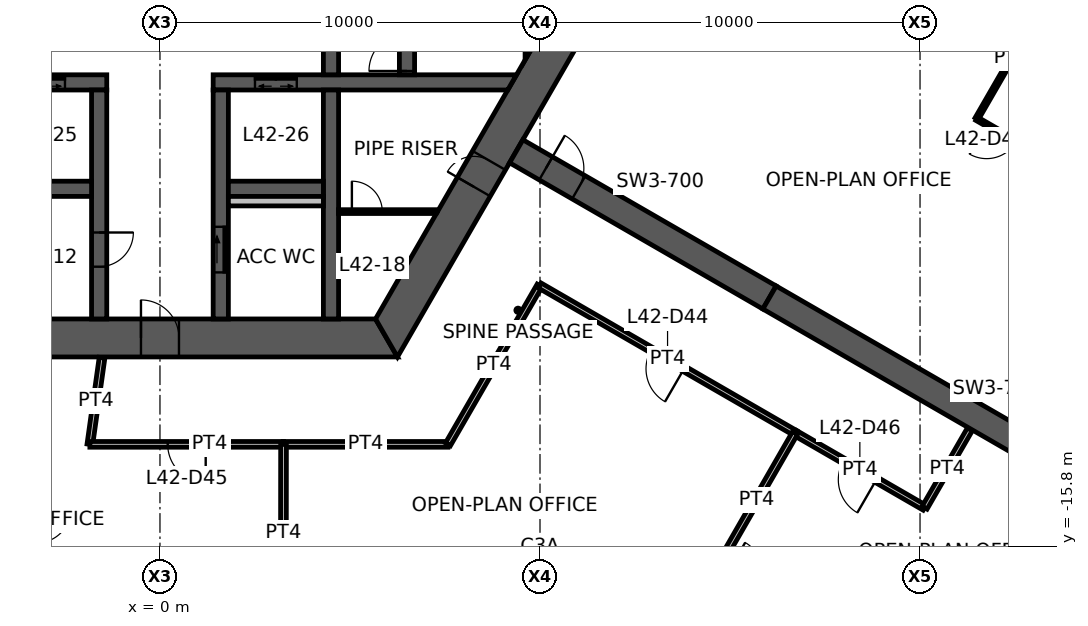
"""IFC4 building model, lengths in metres.
Left out: names, types, materials, properties, quantities, classifications, styles, units other than length and angle.
Written with IfcOpenShell. Run it as: python <this file> out.ifc"""

import sys

from ifc_helpers import new_model, si_unit, direction, frame, frame_2d, origin, place, context, subcontext, project, spatial, polyline, rectangle, outline, extrude, element, fill, save


model = new_model("IFC4")
c1 = context("Model", 3, precision=1e-05, world=origin(), true_north=direction((0.0, 1.0)))
c2 = subcontext(c1, "Body", "Model", "MODEL_VIEW")
j1 = project(units=[si_unit("LENGTHUNIT", "METRE"), si_unit("PLANEANGLEUNIT", "RADIAN")], contexts=[c1])
p1 = place(None, origin())
s1 = spatial("IfcSite", under=j1, at=p1, CompositionType="ELEMENT")
p2 = place(p1, origin())
s2 = spatial("IfcBuilding", under=s1, at=p2, CompositionType="ELEMENT")
p3 = place(p2, frame((0.0, 0.0, 168.2)))
s3 = spatial("IfcBuildingStorey", under=s2, at=p3, CompositionType="ELEMENT", Elevation=168.2)
p4 = place(p3, frame((-5.961, -10.325, 0.0), z_axis=(0.0, 0.0, 1.0), x_axis=(1.0, 0.0, 0.0)))
e1 = element("IfcWall", 1, at=p4, inside=s3, PredefinedType="SHEAR", context=c2, shape_type="SweptSolid", body=[
    extrude(outline(polyline([(-0.289, -0.5), (5.461, -0.5), (6.461, -0.5), (12.211, -0.5), (11.634, 0.5), (6.461, 0.5), (5.461, 0.5), (0.289, 0.5), (-0.289, -0.5)])), origin(), (0.0, 0.0, 1.0), 3.9),
])
p5 = place(p4, frame((5.461, 0.0, 0.0)))
e2 = element("IfcOpeningElement", 2, at=p5, cuts=e1, PredefinedType="OPENING", context=c2, shape_type="SweptSolid", body=[
    extrude(rectangle(XDim=1.0, YDim=2.1, at=frame_2d((0.5, 1.05))), frame((0.0, 0.51, 0.0), z_axis=(0.0, -1.0, 0.0), x_axis=(1.0, 0.0, 0.0)), (0.0, 0.0, 1.0), 1.02),
])
p6 = place(p3, frame((5.961, -10.325, 0.0), z_axis=(0.0, 0.0, 1.0), x_axis=(0.500004296715, 0.866022923061, 0.0)))
e3 = element("IfcWall", 3, at=p6, inside=s3, PredefinedType="SHEAR", context=c2, shape_type="SweptSolid", body=[
    extrude(outline(polyline([(-0.289, -0.5), (4.594, -0.5), (5.394, -0.5), (12.211, -0.5), (11.634, 0.5), (5.394, 0.5), (4.594, 0.5), (0.289, 0.5), (-0.289, -0.5)])), origin(), (0.0, 0.0, 1.0), 3.9),
])
p7 = place(p6, frame((4.594, 0.0, 0.0)))
e4 = element("IfcOpeningElement", 4, at=p7, cuts=e3, PredefinedType="OPENING", context=c2, shape_type="SweptSolid", body=[
    extrude(rectangle(XDim=0.8, YDim=2.1, at=frame_2d((0.4, 1.05))), frame((0.0, 0.51, 0.0), z_axis=(0.0, -1.0, 0.0), x_axis=(1.0, 0.0, 0.0)), (0.0, 0.0, 1.0), 1.02),
])
p8 = place(p3, frame((9.375, -5.413, 0.0), z_axis=(0.0, 0.0, 1.0), x_axis=(0.866032377459, -0.499987921047, 0.0)))
e5 = element("IfcWall", 5, at=p8, inside=s3, PredefinedType="SHEAR", context=c2, shape_type="SweptSolid", body=[
    extrude(rectangle(XDim=7.696, YDim=0.7, at=frame_2d((3.848, 0.0))), origin(), (0.0, 0.0, 1.0), 3.9),
])
p9 = place(p8, frame((0.9, 0.0, 0.0)))
e6 = element("IfcOpeningElement", 6, at=p9, cuts=e5, PredefinedType="OPENING", context=c2, shape_type="SweptSolid", body=[
    extrude(rectangle(XDim=1.0, YDim=2.1, at=frame_2d((0.5, 1.05))), frame((0.0, 0.36, 0.0), z_axis=(0.0, -1.0, 0.0), x_axis=(1.0, 0.0, 0.0)), (0.0, 0.0, 1.0), 0.72),
])
p10 = place(p3, frame((16.039, -9.26, 0.0), z_axis=(0.0, 0.0, 1.0), x_axis=(0.866024837091, -0.50000098154, 0.0)))
e7 = element("IfcWall", 7, at=p10, inside=s3, PredefinedType="SHEAR", context=c2, shape_type="SweptSolid", body=[
    extrude(rectangle(XDim=13.0, YDim=0.7, at=frame_2d((6.5, 0.0))), origin(), (0.0, 0.0, 1.0), 3.9),
])
p11 = place(p3, frame((-9.266, -3.6, 0.0), z_axis=(0.0, 0.0, 1.0), x_axis=(1.0, 0.0, 0.0)))
e8 = element("IfcWall", 8, at=p11, inside=s3, PredefinedType="SHEAR", context=c2, shape_type="SweptSolid", body=[
    extrude(outline(polyline([(0.115, -0.2), (3.116, -0.2), (4.417, -0.2), (5.667, -0.2), (6.767, -0.2), (7.866, -0.2), (7.866, 0.2), (6.767, 0.2), (5.667, 0.2), (4.417, 0.2), (3.116, 0.2), (-0.115, 0.2), (0.115, -0.2)])), origin(), (0.0, 0.0, 1.0), 3.9),
])
p12 = place(p11, frame((5.667, 0.0, 0.0)))
e9 = element("IfcOpeningElement", 9, at=p12, cuts=e8, PredefinedType="OPENING", context=c2, shape_type="SweptSolid", body=[
    extrude(rectangle(XDim=1.1, YDim=2.1, at=frame_2d((0.55, 1.05))), frame((0.0, 0.21, 0.0), z_axis=(0.0, -1.0, 0.0), x_axis=(1.0, 0.0, 0.0)), (0.0, 0.0, 1.0), 0.42),
])
p13 = place(p11, frame((3.116, 0.0, 0.0)))
e10 = element("IfcOpeningElement", 10, at=p13, cuts=e8, PredefinedType="OPENING", context=c2, shape_type="SweptSolid", body=[
    extrude(rectangle(XDim=1.3, YDim=2.1, at=frame_2d((0.65, 1.05))), frame((0.0, 0.21, 0.0), z_axis=(0.0, -1.0, 0.0), x_axis=(1.0, 0.0, 0.0)), (0.0, 0.0, 1.0), 0.42),
])
p14 = place(p3, frame((1.4, -3.6, 0.0), z_axis=(0.0, 0.0, 1.0), x_axis=(1.0, 0.0, 0.0)))
e11 = element("IfcWall", 11, at=p14, inside=s3, PredefinedType="SHEAR", context=c2, shape_type="SweptSolid", body=[
    extrude(outline(polyline([(0.0, -0.2), (1.1, -0.2), (2.2, -0.2), (7.751, -0.2), (7.982, 0.2), (2.2, 0.2), (1.1, 0.2), (0.0, 0.2), (0.0, -0.2)])), origin(), (0.0, 0.0, 1.0), 3.9),
])
p15 = place(p14, frame((1.1, 0.0, 0.0)))
e12 = element("IfcOpeningElement", 12, at=p15, cuts=e11, PredefinedType="OPENING", context=c2, shape_type="SweptSolid", body=[
    extrude(rectangle(XDim=1.1, YDim=2.1, at=frame_2d((0.55, 1.05))), frame((0.0, 0.21, 0.0), z_axis=(0.0, -1.0, 0.0), x_axis=(1.0, 0.0, 0.0)), (0.0, 0.0, 1.0), 0.42),
])
p16 = place(p3, frame((-1.6, -3.8, 0.0), z_axis=(0.0, 0.0, 1.0), x_axis=(0.0, -1.0, 0.0)))
e13 = element("IfcWall", 13, at=p16, inside=s3, PredefinedType="SHEAR", context=c2, shape_type="SweptSolid", body=[
    extrude(rectangle(XDim=6.025, YDim=0.4, at=frame_2d((3.012, 0.0))), origin(), (0.0, 0.0, 1.0), 3.9),
])
p17 = place(p16, frame((3.75, 0.0, 0.0)))
e14 = element("IfcOpeningElement", 14, at=p17, cuts=e13, PredefinedType="OPENING", context=c2, shape_type="SweptSolid", body=[
    extrude(rectangle(XDim=0.9, YDim=2.1, at=frame_2d((0.45, 1.05))), frame((0.0, 0.21, 0.0), z_axis=(0.0, -1.0, 0.0), x_axis=(1.0, 0.0, 0.0)), (0.0, 0.0, 1.0), 0.42),
])
p18 = place(p3, frame((1.6, -3.8, 0.0), z_axis=(0.0, 0.0, 1.0), x_axis=(0.0, -1.0, 0.0)))
e15 = element("IfcWall", 15, at=p18, inside=s3, PredefinedType="SHEAR", context=c2, shape_type="SweptSolid", body=[
    extrude(rectangle(XDim=6.025, YDim=0.4, at=frame_2d((3.012, 0.0))), origin(), (0.0, 0.0, 1.0), 3.9),
])
p19 = place(p18, frame((3.6, 0.0, 0.0)))
e16 = element("IfcOpeningElement", 16, at=p19, cuts=e15, PredefinedType="OPENING", context=c2, shape_type="SweptSolid", body=[
    extrude(rectangle(XDim=1.2, YDim=2.1, at=frame_2d((0.6, 1.05))), frame((0.0, 0.21, 0.0), z_axis=(0.0, -1.0, 0.0), x_axis=(1.0, 0.0, 0.0)), (0.0, 0.0, 1.0), 0.42),
])
p20 = place(p3, frame((4.5, -3.4, 0.0), z_axis=(0.0, 0.0, 1.0), x_axis=(0.0, 1.0, 0.0)))
e17 = element("IfcWall", 17, at=p20, inside=s3, PredefinedType="SHEAR", context=c2, shape_type="SweptSolid", body=[
    extrude(rectangle(XDim=6.8, YDim=0.4, at=frame_2d((3.4, 0.0))), origin(), (0.0, 0.0, 1.0), 3.9),
])
p21 = place(p20, frame((2.9, 0.0, 0.0)))
e18 = element("IfcOpeningElement", 18, at=p21, cuts=e17, PredefinedType="OPENING", context=c2, shape_type="SweptSolid", body=[
    extrude(rectangle(XDim=1.0, YDim=2.1, at=frame_2d((0.5, 1.05))), frame((0.0, 0.21, 0.0), z_axis=(0.0, -1.0, 0.0), x_axis=(1.0, 0.0, 0.0)), (0.0, 0.0, 1.0), 0.42),
])
p22 = place(p3, frame((6.5, -3.4, 0.0), z_axis=(0.0, 0.0, 1.0), x_axis=(0.0, 1.0, 0.0)))
e19 = element("IfcWall", 19, at=p22, inside=s3, PredefinedType="SHEAR", context=c2, shape_type="SweptSolid", body=[
    extrude(rectangle(XDim=6.8, YDim=0.4, at=frame_2d((3.4, 0.0))), origin(), (0.0, 0.0, 1.0), 3.9),
])
p23 = place(p22, frame((0.1, 0.0, 0.0)))
e20 = element("IfcOpeningElement", 20, at=p23, cuts=e19, PredefinedType="OPENING", context=c2, shape_type="SweptSolid", body=[
    extrude(rectangle(XDim=1.0, YDim=2.1, at=frame_2d((0.5, 1.05))), frame((0.0, 0.21, 0.0), z_axis=(0.0, -1.0, 0.0), x_axis=(1.0, 0.0, 0.0)), (0.0, 0.0, 1.0), 0.42),
])
p24 = place(p3, frame((4.5, -3.8, 0.0), z_axis=(0.0, 0.0, 1.0), x_axis=(0.0, -1.0, 0.0)))
e21 = element("IfcWall", 21, at=p24, inside=s3, PredefinedType="SHEAR", context=c2, shape_type="SweptSolid", body=[
    extrude(rectangle(XDim=6.025, YDim=0.4, at=frame_2d((3.012, 0.0))), origin(), (0.0, 0.0, 1.0), 3.9),
])
for number, where, z_axis, x_axis in (
    (22, (-4.3, -6.4, 0.0), (0.0, 0.0, 1.0), (1.0, 0.0, 0.0)),
    (23, (1.8, -6.4, 0.0), (0.0, 0.0, 1.0), (1.0, 0.0, 0.0)),
):
    element("IfcWall", number, at=place(p3, frame(where, z_axis=z_axis, x_axis=x_axis)), inside=s3, PredefinedType="SHEAR", context=c2, shape_type="SweptSolid", body=[
        extrude(rectangle(XDim=2.5, YDim=0.4, at=frame_2d((1.25, 0.0))), origin(), (0.0, 0.0, 1.0), 3.9),
    ])
p25 = place(p3, frame((9.808, -2.662, 0.0), z_axis=(0.0, 0.0, 1.0), x_axis=(0.0, 1.0, 0.0)))
e24 = element("IfcWall", 24, at=p25, inside=s3, PredefinedType="SHEAR", context=c2, shape_type="SweptSolid", body=[
    extrude(outline(polyline([(0.346, -0.2), (4.978, -0.2), (5.671, 0.2), (-0.346, 0.2), (0.346, -0.2)])), origin(), (0.0, 0.0, 1.0), 3.9),
])
p26 = place(p3, frame((1.8, -6.725, 0.0), z_axis=(0.0, 0.0, 1.0), x_axis=(1.0, 0.0, 0.0)))
e25 = element("IfcWall", 25, at=p26, inside=s3, PredefinedType="PLUMBINGWALL", context=c2, shape_type="SweptSolid", body=[
    extrude(rectangle(XDim=2.5, YDim=0.25, at=frame_2d((1.25, 0.0))), origin(), (0.0, 0.0, 1.0), 3.9),
])
p27 = place(p3, frame((4.7, -7.0, 0.0), z_axis=(0.0, 0.0, 1.0), x_axis=(1.0, 0.0, 0.0)))
e26 = element("IfcWall", 26, at=p27, inside=s3, PredefinedType="PARTITIONING", context=c2, shape_type="SweptSolid", body=[
    extrude(outline(polyline([(0.0, -0.05), (0.35, -0.05), (1.15, -0.05), (2.575, -0.05), (2.604, 0.0), (2.609, 0.05), (1.15, 0.05), (0.35, 0.05), (0.0, 0.05), (0.0, -0.05)])), origin(), (0.0, 0.0, 1.0), 2.95),
])
p28 = place(p27, frame((0.35, 0.0, 0.0)))
e27 = element("IfcOpeningElement", 27, at=p28, cuts=e26, PredefinedType="OPENING", context=c2, shape_type="SweptSolid", body=[
    extrude(rectangle(XDim=0.8, YDim=2.1, at=frame_2d((0.4, 1.05))), frame((0.0, 0.06, 0.0), z_axis=(0.0, -1.0, 0.0), x_axis=(1.0, 0.0, 0.0)), (0.0, 0.0, 1.0), 0.12),
])
p29 = place(p3, frame((21.492, -4.557, 0.0), z_axis=(0.0, 0.0, 1.0), x_axis=(0.500013413428, 0.866017659399, 0.0)))
e28 = element("IfcWall", 28, at=p29, inside=s3, PredefinedType="PARTITIONING", context=c2, shape_type="SweptSolid", body=[
    extrude(rectangle(XDim=3.68, YDim=0.1, at=frame_2d((1.84, 0.0))), origin(), (0.0, 0.0, 1.0), 2.95),
])
p30 = place(p3, frame((27.227, -7.863, 0.0), z_axis=(0.0, 0.0, 1.0), x_axis=(-0.866343956507, 0.499447844147, 0.0)))
e29 = element("IfcWall", 29, at=p30, inside=s3, PredefinedType="PARTITIONING", context=c2, shape_type="SweptSolid", body=[
    extrude(rectangle(XDim=6.62, YDim=0.1, at=frame_2d((3.31, 0.0))), origin(), (0.0, 0.0, 1.0), 2.95),
])
p31 = place(p30, frame((5.42, 0.0, 0.0)))
e30 = element("IfcOpeningElement", 30, at=p31, cuts=e29, PredefinedType="OPENING", context=c2, shape_type="SweptSolid", body=[
    extrude(rectangle(XDim=0.9, YDim=2.1, at=frame_2d((0.45, 1.05))), frame((0.0, 0.06, 0.0), z_axis=(0.0, -1.0, 0.0), x_axis=(1.0, 0.0, 0.0)), (0.0, 0.0, 1.0), 0.12),
])
p32 = place(p3, frame((7.578, -13.125, 0.0), z_axis=(0.0, 0.0, 1.0), x_axis=(-1.0, 0.0, 0.0)))
e31 = element("IfcWall", 31, at=p32, inside=s3, PredefinedType="PARTITIONING", context=c2, shape_type="SweptSolid", body=[
    extrude(rectangle(XDim=4.336, YDim=0.15, at=frame_2d((2.168, 0.0))), origin(), (0.0, 0.0, 1.0), 2.95),
])
p33 = place(p3, frame((9.992, -8.944, 0.0), z_axis=(0.0, 0.0, 1.0), x_axis=(-0.500033248206, -0.866006207073, 0.0)))
e32 = element("IfcWall", 32, at=p33, inside=s3, PredefinedType="PARTITIONING", context=c2, shape_type="SweptSolid", body=[
    extrude(rectangle(XDim=4.828, YDim=0.15, at=frame_2d((2.414, 0.0))), origin(), (0.0, 0.0, 1.0), 2.95),
])
p34 = place(p3, frame((16.721, -12.83, 0.0), z_axis=(0.0, 0.0, 1.0), x_axis=(-0.866020780657, 0.500008007406, 0.0)))
e33 = element("IfcWall", 33, at=p34, inside=s3, PredefinedType="PARTITIONING", context=c2, shape_type="SweptSolid", body=[
    extrude(rectangle(XDim=7.771, YDim=0.15, at=frame_2d((3.885, 0.0))), origin(), (0.0, 0.0, 1.0), 2.95),
])
p35 = place(p34, frame((3.385, 0.0, 0.0)))
e34 = element("IfcOpeningElement", 34, at=p35, cuts=e33, PredefinedType="OPENING", context=c2, shape_type="SweptSolid", body=[
    extrude(rectangle(XDim=1.0, YDim=2.1, at=frame_2d((0.5, 1.05))), frame((0.0, 0.085, 0.0), z_axis=(0.0, -1.0, 0.0), x_axis=(1.0, 0.0, 0.0)), (0.0, 0.0, 1.0), 0.17),
])
p36 = place(p3, frame((-1.844, -13.125, 0.0), z_axis=(0.0, 0.0, 1.0), x_axis=(0.139119980631, 0.990275532864, 0.0)))
e35 = element("IfcWall", 35, at=p36, inside=s3, PredefinedType="PARTITIONING", context=c2, shape_type="SweptSolid", body=[
    extrude(rectangle(XDim=2.302, YDim=0.15, at=frame_2d((1.151, 0.0))), origin(), (0.0, 0.0, 1.0), 2.95),
])
p37 = place(p3, frame((3.251, -13.125, 0.0), z_axis=(0.0, 0.0, 1.0), x_axis=(-1.0, 0.0, 0.0)))
e36 = element("IfcWall", 36, at=p37, inside=s3, PredefinedType="PARTITIONING", context=c2, shape_type="SweptSolid", body=[
    extrude(rectangle(XDim=5.096, YDim=0.15, at=frame_2d((2.548, 0.0))), origin(), (0.0, 0.0, 1.0), 2.95),
])
p38 = place(p37, frame((2.048, 0.0, 0.0)))
e37 = element("IfcOpeningElement", 37, at=p38, cuts=e36, PredefinedType="OPENING", context=c2, shape_type="SweptSolid", body=[
    extrude(rectangle(XDim=1.0, YDim=2.1, at=frame_2d((0.5, 1.05))), frame((0.0, 0.085, 0.0), z_axis=(0.0, -1.0, 0.0), x_axis=(1.0, 0.0, 0.0)), (0.0, 0.0, 1.0), 0.17),
])
p39 = place(p3, frame((20.12, -14.792, 0.0), z_axis=(0.0, 0.0, 1.0), x_axis=(-0.866038848349, 0.499976712608, 0.0)))
e38 = element("IfcWall", 38, at=p39, inside=s3, PredefinedType="PARTITIONING", context=c2, shape_type="SweptSolid", body=[
    extrude(rectangle(XDim=3.934, YDim=0.15, at=frame_2d((1.967, 0.0))), origin(), (0.0, 0.0, 1.0), 2.95),
])
p40 = place(p39, frame((1.467, 0.0, 0.0)))
e39 = element("IfcOpeningElement", 39, at=p40, cuts=e38, PredefinedType="OPENING", context=c2, shape_type="SweptSolid", body=[
    extrude(rectangle(XDim=1.0, YDim=2.1, at=frame_2d((0.5, 1.05))), frame((0.0, 0.085, 0.0), z_axis=(0.0, -1.0, 0.0), x_axis=(1.0, 0.0, 0.0)), (0.0, 0.0, 1.0), 0.17),
])
p41 = place(p3, frame((21.31, -12.731, 0.0), z_axis=(0.0, 0.0, 1.0), x_axis=(-0.500077627542, -0.865980580863, 0.0)))
e40 = element("IfcWall", 40, at=p41, inside=s3, PredefinedType="PARTITIONING", context=c2, shape_type="SweptSolid", body=[
    extrude(rectangle(XDim=2.38, YDim=0.15, at=frame_2d((1.19, 0.0))), origin(), (0.0, 0.0, 1.0), 2.95),
])
p42 = place(p3, frame((3.246, -17.801, 0.0), z_axis=(0.0, 0.0, 1.0), x_axis=(0.001096662352, 0.999999398666, 0.0)))
e41 = element("IfcWall", 41, at=p42, inside=s3, PredefinedType="PARTITIONING", context=c2, shape_type="SweptSolid", body=[
    extrude(rectangle(XDim=4.675, YDim=0.15, at=frame_2d((2.337, 0.0))), origin(), (0.0, 0.0, 1.0), 2.95),
])
p43 = place(p3, frame((16.713, -12.825, 0.0), z_axis=(0.0, 0.0, 1.0), x_axis=(-0.498976779382, -0.866615355067, 0.0)))
e42 = element("IfcWall", 42, at=p43, inside=s3, PredefinedType="PARTITIONING", context=c2, shape_type="SweptSolid", body=[
    extrude(rectangle(XDim=4.054, YDim=0.15, at=frame_2d((2.027, 0.0))), origin(), (0.0, 0.0, 1.0), 2.95),
])
p44 = place(p5, origin())
e43 = element("IfcDoor", 43, at=p44, inside=s3, OperationType="SINGLE_SWING_LEFT", PredefinedType="DOOR", context=c2, shape_type="SweptSolid", body=[
    extrude(rectangle(XDim=1.0, YDim=2.1, at=frame_2d((0.5, 1.05))), frame((0.0, 0.025, 0.0), z_axis=(0.0, -1.0, 0.0), x_axis=(1.0, 0.0, 0.0)), (0.0, 0.0, 1.0), 0.05),
])
fill(e2, e43)
p45 = place(p7, origin())
e44 = element("IfcDoor", 44, at=p45, inside=s3, OperationType="SINGLE_SWING_LEFT", PredefinedType="DOOR", context=c2, shape_type="SweptSolid", body=[
    extrude(rectangle(XDim=0.8, YDim=2.1, at=frame_2d((0.4, 1.05))), frame((0.0, 0.025, 0.0), z_axis=(0.0, -1.0, 0.0), x_axis=(1.0, 0.0, 0.0)), (0.0, 0.0, 1.0), 0.05),
])
fill(e4, e44)
p46 = place(p23, origin())
e45 = element("IfcDoor", 45, at=p46, inside=s3, OperationType="SINGLE_SWING_LEFT", PredefinedType="DOOR", context=c2, shape_type="SweptSolid", body=[
    extrude(rectangle(XDim=1.0, YDim=2.1, at=frame_2d((0.5, 1.05))), frame((0.0, 0.025, 0.0), z_axis=(0.0, -1.0, 0.0), x_axis=(1.0, 0.0, 0.0)), (0.0, 0.0, 1.0), 0.05),
])
fill(e20, e45)
p47 = place(p19, origin())
e46 = element("IfcDoor", 46, at=p47, inside=s3, OperationType="SLIDING_TO_LEFT", PredefinedType="DOOR", context=c2, shape_type="SweptSolid", body=[
    extrude(rectangle(XDim=1.2, YDim=2.1, at=frame_2d((0.6, 1.05))), frame((0.0, 0.025, 0.0), z_axis=(0.0, -1.0, 0.0), x_axis=(1.0, 0.0, 0.0)), (0.0, 0.0, 1.0), 0.05),
])
fill(e16, e46)
p48 = place(p17, origin())
e47 = element("IfcDoor", 47, at=p48, inside=s3, OperationType="SINGLE_SWING_LEFT", PredefinedType="DOOR", context=c2, shape_type="SweptSolid", body=[
    extrude(rectangle(XDim=0.9, YDim=2.1, at=frame_2d((0.45, 1.05))), frame((0.0, 0.025, 0.0), z_axis=(0.0, -1.0, 0.0), x_axis=(1.0, 0.0, 0.0)), (0.0, 0.0, 1.0), 0.05),
])
fill(e14, e47)
p49 = place(p9, origin())
e48 = element("IfcDoor", 48, at=p49, inside=s3, OperationType="SINGLE_SWING_LEFT", PredefinedType="DOOR", context=c2, shape_type="SweptSolid", body=[
    extrude(rectangle(XDim=1.0, YDim=2.1, at=frame_2d((0.5, 1.05))), frame((0.0, 0.025, 0.0), z_axis=(0.0, -1.0, 0.0), x_axis=(1.0, 0.0, 0.0)), (0.0, 0.0, 1.0), 0.05),
])
fill(e6, e48)
p50 = place(p28, origin())
e49 = element("IfcDoor", 49, at=p50, inside=s3, OperationType="SINGLE_SWING_LEFT", PredefinedType="DOOR", context=c2, shape_type="SweptSolid", body=[
    extrude(rectangle(XDim=0.8, YDim=2.1, at=frame_2d((0.4, 1.05))), frame((0.0, 0.025, 0.0), z_axis=(0.0, -1.0, 0.0), x_axis=(1.0, 0.0, 0.0)), (0.0, 0.0, 1.0), 0.05),
])
fill(e27, e49)
p51 = place(p31, origin())
e50 = element("IfcDoor", 50, at=p51, inside=s3, OperationType="SINGLE_SWING_RIGHT", PredefinedType="DOOR", context=c2, shape_type="SweptSolid", body=[
    extrude(rectangle(XDim=0.9, YDim=2.1, at=frame_2d((0.45, 1.05))), frame((0.0, 0.025, 0.0), z_axis=(0.0, -1.0, 0.0), x_axis=(1.0, 0.0, 0.0)), (0.0, 0.0, 1.0), 0.05),
])
fill(e30, e50)
p52 = place(p35, origin())
e51 = element("IfcDoor", 51, at=p52, inside=s3, OperationType="SINGLE_SWING_LEFT", PredefinedType="DOOR", context=c2, shape_type="SweptSolid", body=[
    extrude(rectangle(XDim=1.0, YDim=2.1, at=frame_2d((0.5, 1.05))), frame((0.0, 0.025, 0.0), z_axis=(0.0, -1.0, 0.0), x_axis=(1.0, 0.0, 0.0)), (0.0, 0.0, 1.0), 0.05),
])
fill(e34, e51)
p53 = place(p38, origin())
e52 = element("IfcDoor", 52, at=p53, inside=s3, OperationType="SINGLE_SWING_LEFT", PredefinedType="DOOR", context=c2, shape_type="SweptSolid", body=[
    extrude(rectangle(XDim=1.0, YDim=2.1, at=frame_2d((0.5, 1.05))), frame((0.0, 0.025, 0.0), z_axis=(0.0, -1.0, 0.0), x_axis=(1.0, 0.0, 0.0)), (0.0, 0.0, 1.0), 0.05),
])
fill(e37, e52)
p54 = place(p40, origin())
e53 = element("IfcDoor", 53, at=p54, inside=s3, OperationType="SINGLE_SWING_LEFT", PredefinedType="DOOR", context=c2, shape_type="SweptSolid", body=[
    extrude(rectangle(XDim=1.0, YDim=2.1, at=frame_2d((0.5, 1.05))), frame((0.0, 0.025, 0.0), z_axis=(0.0, -1.0, 0.0), x_axis=(1.0, 0.0, 0.0)), (0.0, 0.0, 1.0), 0.05),
])
fill(e39, e53)
p55 = place(p15, origin())
e54 = element("IfcDoor", 54, at=p55, inside=s3, OperationType="DOUBLE_DOOR_SLIDING", PredefinedType="DOOR", context=c2, shape_type="SweptSolid", body=[
    extrude(rectangle(XDim=1.1, YDim=2.1, at=frame_2d((0.55, 1.05))), frame((0.0, 0.025, 0.0), z_axis=(0.0, -1.0, 0.0), x_axis=(1.0, 0.0, 0.0)), (0.0, 0.0, 1.0), 0.05),
])
fill(e12, e54)
p56 = place(p12, origin())
e55 = element("IfcDoor", 55, at=p56, inside=s3, OperationType="DOUBLE_DOOR_SLIDING", PredefinedType="DOOR", context=c2, shape_type="SweptSolid", body=[
    extrude(rectangle(XDim=1.1, YDim=2.1, at=frame_2d((0.55, 1.05))), frame((0.0, 0.025, 0.0), z_axis=(0.0, -1.0, 0.0), x_axis=(1.0, 0.0, 0.0)), (0.0, 0.0, 1.0), 0.05),
])
fill(e9, e55)
save(model, sys.argv[1])
